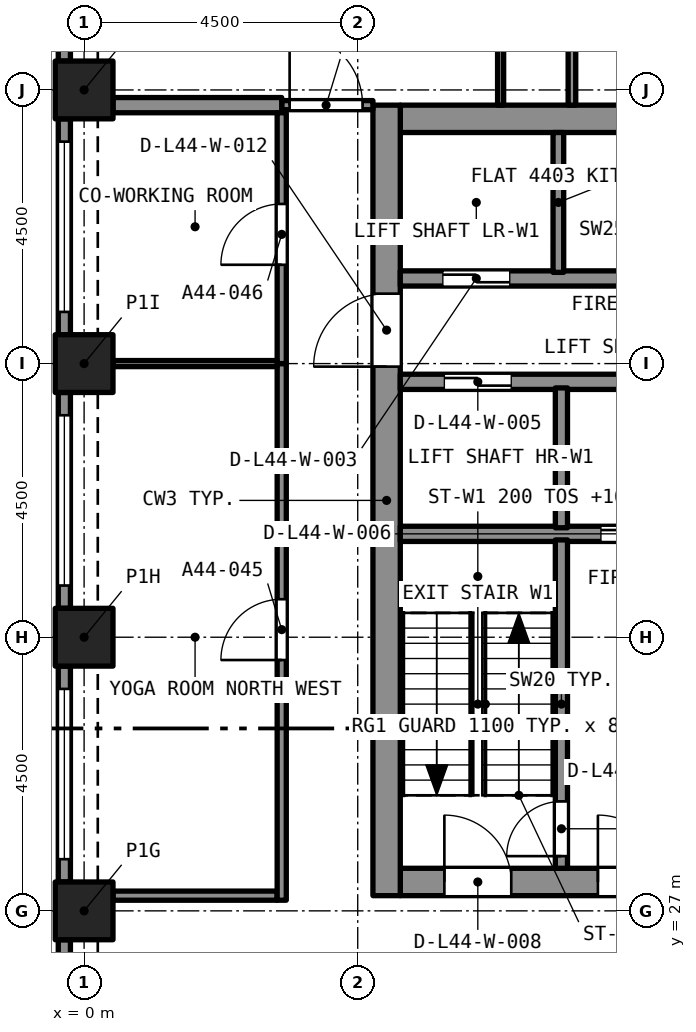
"""IFC4 building model, lengths in metres.
Left out: names, types, materials, properties, quantities, classifications, styles, units other than length and angle.
Written with IfcOpenShell. Run it as: python <this file> out.ifc"""

import sys

from ifc_helpers import new_model, si_unit, direction, frame, frame_2d, origin, origin_2d, place, context, subcontext, project, spatial, rectangle, extrude, element, fill, save


model = new_model("IFC4")
c1 = context("Model", 3, precision=1e-05, world=origin(), true_north=direction((0.0, 1.0)))
c2 = subcontext(c1, "Body", "Model", "MODEL_VIEW")
j1 = project(units=[si_unit("LENGTHUNIT", "METRE"), si_unit("PLANEANGLEUNIT", "RADIAN")], contexts=[c1])
p1 = place(None, origin())
s1 = spatial("IfcSite", under=j1, at=p1, CompositionType="ELEMENT")
p2 = place(p1, origin())
s2 = spatial("IfcBuilding", under=s1, at=p2, CompositionType="ELEMENT")
p3 = place(p2, frame((0.0, 0.0, 159.4)))
s3 = spatial("IfcBuildingStorey", under=s2, at=p3, CompositionType="ELEMENT", Elevation=159.4)
for number, where, z_axis, x_axis in (
    (1, (0.0, 27.0, 0.0), (0.0, 0.0, 1.0), (1.0, 0.0, 0.0)),
    (2, (0.0, 31.5, 0.0), (0.0, 0.0, 1.0), (1.0, 0.0, 0.0)),
    (3, (0.0, 36.0, 0.0), (0.0, 0.0, 1.0), (1.0, 0.0, 0.0)),
    (4, (0.0, 40.5, 0.0), (0.0, 0.0, 1.0), (1.0, 0.0, 0.0)),
):
    element("IfcColumn", number, at=place(p3, frame(where, z_axis=z_axis, x_axis=x_axis)), inside=s3, PredefinedType="COLUMN", context=c2, shape_type="SweptSolid", body=[
        extrude(rectangle(XDim=0.95, YDim=0.95, at=origin_2d()), origin(), (0.0, 0.0, 1.0), 4.4),
    ])
p4 = place(p3, frame((5.2, 27.475, 0.0), z_axis=(0.0, 0.0, 1.0), x_axis=(1.0, 0.0, 0.0)))
e5 = element("IfcWall", 5, at=p4, inside=s3, PredefinedType="SOLIDWALL", context=c2, shape_type="SweptSolid", body=[
    extrude(rectangle(XDim=7.6, YDim=0.45, at=frame_2d((3.8, 0.0))), origin(), (0.0, 0.0, 1.0), 4.4),
])
p5 = place(p4, frame((0.725, 0.0, 0.0)))
e6 = element("IfcOpeningElement", 6, at=p5, cuts=e5, PredefinedType="OPENING", context=c2, shape_type="SweptSolid", body=[
    extrude(rectangle(XDim=1.1, YDim=2.1, at=frame_2d((0.55, 1.05))), frame((0.0, 0.235, 0.0), z_axis=(0.0, -1.0, 0.0), x_axis=(1.0, 0.0, 0.0)), (0.0, 0.0, 1.0), 0.47),
])
p6 = place(p4, frame((3.25, 0.0, 0.0)))
e7 = element("IfcOpeningElement", 7, at=p6, cuts=e5, PredefinedType="OPENING", context=c2, shape_type="SweptSolid", body=[
    extrude(rectangle(XDim=1.1, YDim=2.1, at=frame_2d((0.55, 1.05))), frame((0.0, 0.235, 0.0), z_axis=(0.0, -1.0, 0.0), x_axis=(1.0, 0.0, 0.0)), (0.0, 0.0, 1.0), 0.47),
])
p7 = place(p4, frame((5.775, 0.0, 0.0)))
e8 = element("IfcOpeningElement", 8, at=p7, cuts=e5, PredefinedType="OPENING", context=c2, shape_type="SweptSolid", body=[
    extrude(rectangle(XDim=1.1, YDim=2.1, at=frame_2d((0.55, 1.05))), frame((0.0, 0.235, 0.0), z_axis=(0.0, -1.0, 0.0), x_axis=(1.0, 0.0, 0.0)), (0.0, 0.0, 1.0), 0.47),
])
p8 = place(p3, frame((5.2, 40.025, 0.0), z_axis=(0.0, 0.0, 1.0), x_axis=(1.0, 0.0, 0.0)))
e9 = element("IfcWall", 9, at=p8, inside=s3, PredefinedType="SOLIDWALL", context=c2, shape_type="SweptSolid", body=[
    extrude(rectangle(XDim=7.6, YDim=0.45, at=frame_2d((3.8, 0.0))), origin(), (0.0, 0.0, 1.0), 4.4),
])
p9 = place(p3, frame((4.975, 27.25, 0.0), z_axis=(0.0, 0.0, 1.0), x_axis=(0.0, 1.0, 0.0)))
e10 = element("IfcWall", 10, at=p9, inside=s3, PredefinedType="SOLIDWALL", context=c2, shape_type="SweptSolid", body=[
    extrude(rectangle(XDim=13.0, YDim=0.45, at=frame_2d((6.5, 0.0))), origin(), (0.0, 0.0, 1.0), 4.4),
])
p10 = place(p9, frame((8.7, 0.0, 0.0)))
e11 = element("IfcOpeningElement", 11, at=p10, cuts=e10, PredefinedType="OPENING", context=c2, shape_type="SweptSolid", body=[
    extrude(rectangle(XDim=1.2, YDim=2.1, at=frame_2d((0.6, 1.05))), frame((0.0, 0.235, 0.0), z_axis=(0.0, -1.0, 0.0), x_axis=(1.0, 0.0, 0.0)), (0.0, 0.0, 1.0), 0.47),
])
p11 = place(p3, frame((-0.325, 40.975, 0.0), z_axis=(0.0, 0.0, 1.0), x_axis=(0.0, 1.0, 0.0)))
e12 = element("IfcWall", 12, at=p11, inside=s3, PredefinedType="SOLIDWALL", context=c2, shape_type="SweptSolid", body=[
    extrude(rectangle(XDim=3.55, YDim=0.2, at=frame_2d((1.775, 0.0))), origin(), (0.0, 0.0, 1.0), 4.4),
])
p12 = place(p11, frame((0.375, 0.0, 0.45)))
e13 = element("IfcOpeningElement", 13, at=p12, cuts=e12, PredefinedType="OPENING", context=c2, shape_type="SweptSolid", body=[
    extrude(rectangle(XDim=2.8, YDim=2.55, at=frame_2d((1.4, 1.275))), frame((0.0, 0.11, 0.0), z_axis=(0.0, -1.0, 0.0), x_axis=(1.0, 0.0, 0.0)), (0.0, 0.0, 1.0), 0.22),
])
p13 = place(p3, frame((-0.325, 36.475, 0.0), z_axis=(0.0, 0.0, 1.0), x_axis=(0.0, 1.0, 0.0)))
e14 = element("IfcWall", 14, at=p13, inside=s3, PredefinedType="SOLIDWALL", context=c2, shape_type="SweptSolid", body=[
    extrude(rectangle(XDim=3.55, YDim=0.2, at=frame_2d((1.775, 0.0))), origin(), (0.0, 0.0, 1.0), 4.4),
])
p14 = place(p13, frame((0.375, 0.0, 0.45)))
e15 = element("IfcOpeningElement", 15, at=p14, cuts=e14, PredefinedType="OPENING", context=c2, shape_type="SweptSolid", body=[
    extrude(rectangle(XDim=2.8, YDim=2.55, at=frame_2d((1.4, 1.275))), frame((0.0, 0.11, 0.0), z_axis=(0.0, -1.0, 0.0), x_axis=(1.0, 0.0, 0.0)), (0.0, 0.0, 1.0), 0.22),
])
p15 = place(p3, frame((-0.325, 31.975, 0.0), z_axis=(0.0, 0.0, 1.0), x_axis=(0.0, 1.0, 0.0)))
e16 = element("IfcWall", 16, at=p15, inside=s3, PredefinedType="SOLIDWALL", context=c2, shape_type="SweptSolid", body=[
    extrude(rectangle(XDim=3.55, YDim=0.2, at=frame_2d((1.775, 0.0))), origin(), (0.0, 0.0, 1.0), 4.4),
])
p16 = place(p15, frame((0.375, 0.0, 0.45)))
e17 = element("IfcOpeningElement", 17, at=p16, cuts=e16, PredefinedType="OPENING", context=c2, shape_type="SweptSolid", body=[
    extrude(rectangle(XDim=2.8, YDim=2.55, at=frame_2d((1.4, 1.275))), frame((0.0, 0.11, 0.0), z_axis=(0.0, -1.0, 0.0), x_axis=(1.0, 0.0, 0.0)), (0.0, 0.0, 1.0), 0.22),
])
p17 = place(p3, frame((-0.325, 27.475, 0.0), z_axis=(0.0, 0.0, 1.0), x_axis=(0.0, 1.0, 0.0)))
e18 = element("IfcWall", 18, at=p17, inside=s3, PredefinedType="SOLIDWALL", context=c2, shape_type="SweptSolid", body=[
    extrude(rectangle(XDim=3.55, YDim=0.2, at=frame_2d((1.775, 0.0))), origin(), (0.0, 0.0, 1.0), 4.4),
])
p18 = place(p17, frame((0.375, 0.0, 0.45)))
e19 = element("IfcOpeningElement", 19, at=p18, cuts=e18, PredefinedType="OPENING", context=c2, shape_type="SweptSolid", body=[
    extrude(rectangle(XDim=2.8, YDim=2.55, at=frame_2d((1.4, 1.275))), frame((0.0, 0.11, 0.0), z_axis=(0.0, -1.0, 0.0), x_axis=(1.0, 0.0, 0.0)), (0.0, 0.0, 1.0), 0.22),
])
p19 = place(p3, frame((-0.325, 22.975, 0.0), z_axis=(0.0, 0.0, 1.0), x_axis=(0.0, 1.0, 0.0)))
e20 = element("IfcWall", 20, at=p19, inside=s3, PredefinedType="SOLIDWALL", context=c2, shape_type="SweptSolid", body=[
    extrude(rectangle(XDim=3.55, YDim=0.2, at=frame_2d((1.775, 0.0))), origin(), (0.0, 0.0, 1.0), 4.4),
])
p20 = place(p19, frame((0.375, 0.0, 0.45)))
e21 = element("IfcOpeningElement", 21, at=p20, cuts=e20, PredefinedType="OPENING", context=c2, shape_type="SweptSolid", body=[
    extrude(rectangle(XDim=2.8, YDim=2.55, at=frame_2d((1.4, 1.275))), frame((0.0, 0.11, 0.0), z_axis=(0.0, -1.0, 0.0), x_axis=(1.0, 0.0, 0.0)), (0.0, 0.0, 1.0), 0.22),
])
p21 = place(p3, frame((8.023, 40.25, 0.0), z_axis=(0.0, 0.0, 1.0), x_axis=(0.0, 1.0, 0.0)))
e22 = element("IfcWall", 22, at=p21, inside=s3, PredefinedType="PARTITIONING", context=c2, shape_type="SweptSolid", body=[
    extrude(rectangle(XDim=3.308, YDim=0.125, at=frame_2d((1.654, 0.0))), origin(), (0.0, 0.0, 1.0), 4.1),
])
p22 = place(p3, frame((6.85, 40.25, 0.0), z_axis=(0.0, 0.0, 1.0), x_axis=(0.0, 1.0, 0.0)))
e23 = element("IfcWall", 23, at=p22, inside=s3, PredefinedType="PARTITIONING", context=c2, shape_type="SweptSolid", body=[
    extrude(rectangle(XDim=3.32, YDim=0.1, at=frame_2d((1.66, 0.0))), origin(), (0.0, 0.0, 1.0), 4.1),
])
p23 = place(p3, frame((3.25, 40.25, 0.0), z_axis=(0.0, 0.0, 1.0), x_axis=(1.0, 0.0, 0.0)))
e24 = element("IfcWall", 24, at=p23, inside=s3, PredefinedType="PARTITIONING", context=c2, shape_type="SweptSolid", body=[
    extrude(rectangle(XDim=1.5, YDim=0.15, at=frame_2d((0.75, 0.0))), origin(), (0.0, 0.0, 1.0), 4.1),
])
p24 = place(p23, frame((0.13, 0.0, 0.0)))
e25 = element("IfcOpeningElement", 25, at=p24, cuts=e24, PredefinedType="OPENING", context=c2, shape_type="SweptSolid", body=[
    extrude(rectangle(XDim=1.2, YDim=2.4, at=frame_2d((0.6, 1.2))), frame((0.0, 0.085, 0.0), z_axis=(0.0, -1.0, 0.0), x_axis=(1.0, 0.0, 0.0)), (0.0, 0.0, 1.0), 0.17),
])
p25 = place(p3, frame((0.475, 40.25, 0.0), z_axis=(0.0, 0.0, 1.0), x_axis=(1.0, 0.0, 0.0)))
e26 = element("IfcWall", 26, at=p25, inside=s3, PredefinedType="PARTITIONING", context=c2, shape_type="SweptSolid", body=[
    extrude(rectangle(XDim=2.775, YDim=0.25, at=frame_2d((1.387, 0.0))), origin(), (0.0, 0.0, 1.0), 4.1),
])
p26 = place(p3, frame((0.475, 27.25, 0.0), z_axis=(0.0, 0.0, 1.0), x_axis=(1.0, 0.0, 0.0)))
e27 = element("IfcWall", 27, at=p26, inside=s3, PredefinedType="PARTITIONING", context=c2, shape_type="SweptSolid", body=[
    extrude(rectangle(XDim=2.7, YDim=0.15, at=frame_2d((1.35, 0.0))), origin(), (0.0, 0.0, 1.0), 4.1),
])
p27 = place(p3, frame((3.25, 27.175, 0.0), z_axis=(0.0, 0.0, 1.0), x_axis=(0.0, 1.0, 0.0)))
e28 = element("IfcWall", 28, at=p27, inside=s3, PredefinedType="PARTITIONING", context=c2, shape_type="SweptSolid", body=[
    extrude(rectangle(XDim=8.825, YDim=0.15, at=frame_2d((4.413, 0.0))), origin(), (0.0, 0.0, 1.0), 4.1),
])
p28 = place(p27, frame((3.95, 0.0, 0.0)))
e29 = element("IfcOpeningElement", 29, at=p28, cuts=e28, PredefinedType="OPENING", context=c2, shape_type="SweptSolid", body=[
    extrude(rectangle(XDim=1.0, YDim=2.1, at=frame_2d((0.5, 1.05))), frame((0.0, 0.085, 0.0), z_axis=(0.0, -1.0, 0.0), x_axis=(1.0, 0.0, 0.0)), (0.0, 0.0, 1.0), 0.17),
])
p29 = place(p3, frame((3.25, 36.0, 0.0), z_axis=(0.0, 0.0, 1.0), x_axis=(0.0, 1.0, 0.0)))
e30 = element("IfcWall", 30, at=p29, inside=s3, PredefinedType="PARTITIONING", context=c2, shape_type="SweptSolid", body=[
    extrude(rectangle(XDim=4.125, YDim=0.15, at=frame_2d((2.062, 0.0))), origin(), (0.0, 0.0, 1.0), 4.1),
])
p30 = place(p29, frame((1.625, 0.0, 0.0)))
e31 = element("IfcOpeningElement", 31, at=p30, cuts=e30, PredefinedType="OPENING", context=c2, shape_type="SweptSolid", body=[
    extrude(rectangle(XDim=1.0, YDim=2.1, at=frame_2d((0.5, 1.05))), frame((0.0, 0.085, 0.0), z_axis=(0.0, -1.0, 0.0), x_axis=(1.0, 0.0, 0.0)), (0.0, 0.0, 1.0), 0.17),
])
p31 = place(p3, frame((0.475, 36.0, 0.0), z_axis=(0.0, 0.0, 1.0), x_axis=(1.0, 0.0, 0.0)))
e32 = element("IfcWall", 32, at=p31, inside=s3, PredefinedType="PARTITIONING", context=c2, shape_type="SweptSolid", body=[
    extrude(rectangle(XDim=2.7, YDim=0.1, at=frame_2d((1.35, 0.0))), origin(), (0.0, 0.0, 1.0), 4.1),
])
p32 = place(p3, frame((5.2, 33.2, 0.0), z_axis=(0.0, 0.0, 1.0), x_axis=(1.0, 0.0, 0.0)))
e33 = element("IfcWall", 33, at=p32, inside=s3, PredefinedType="SOLIDWALL", context=c2, shape_type="SweptSolid", body=[
    extrude(rectangle(XDim=7.6, YDim=0.25, at=frame_2d((3.8, 0.0))), origin(), (0.0, 0.0, 1.0), 4.1),
])
p33 = place(p32, frame((3.3, 0.0, 0.0)))
e34 = element("IfcOpeningElement", 34, at=p33, cuts=e33, PredefinedType="OPENING", context=c2, shape_type="SweptSolid", body=[
    extrude(rectangle(XDim=1.0, YDim=2.1, at=frame_2d((0.5, 1.05))), frame((0.0, 0.135, 0.0), z_axis=(0.0, -1.0, 0.0), x_axis=(1.0, 0.0, 0.0)), (0.0, 0.0, 1.0), 0.27),
])
p34 = place(p3, frame((5.2, 35.7, 0.0), z_axis=(0.0, 0.0, 1.0), x_axis=(1.0, 0.0, 0.0)))
e35 = element("IfcWall", 35, at=p34, inside=s3, PredefinedType="SOLIDWALL", context=c2, shape_type="SweptSolid", body=[
    extrude(rectangle(XDim=7.6, YDim=0.25, at=frame_2d((3.8, 0.0))), origin(), (0.0, 0.0, 1.0), 4.1),
])
p35 = place(p34, frame((0.725, 0.0, 0.0)))
e36 = element("IfcOpeningElement", 36, at=p35, cuts=e35, PredefinedType="OPENING", context=c2, shape_type="SweptSolid", body=[
    extrude(rectangle(XDim=1.1, YDim=2.4, at=frame_2d((0.55, 1.2))), frame((0.0, 0.135, 0.0), z_axis=(0.0, -1.0, 0.0), x_axis=(1.0, 0.0, 0.0)), (0.0, 0.0, 1.0), 0.27),
])
p36 = place(p34, frame((5.875, 0.0, 0.0)))
e37 = element("IfcOpeningElement", 37, at=p36, cuts=e35, PredefinedType="OPENING", context=c2, shape_type="SweptSolid", body=[
    extrude(rectangle(XDim=0.9, YDim=2.1, at=frame_2d((0.45, 1.05))), frame((0.0, 0.135, 0.0), z_axis=(0.0, -1.0, 0.0), x_axis=(1.0, 0.0, 0.0)), (0.0, 0.0, 1.0), 0.27),
])
p37 = place(p3, frame((5.2, 37.4, 0.0), z_axis=(0.0, 0.0, 1.0), x_axis=(1.0, 0.0, 0.0)))
e38 = element("IfcWall", 38, at=p37, inside=s3, PredefinedType="SOLIDWALL", context=c2, shape_type="SweptSolid", body=[
    extrude(rectangle(XDim=7.6, YDim=0.25, at=frame_2d((3.8, 0.0))), origin(), (0.0, 0.0, 1.0), 4.1),
])
p38 = place(p37, frame((0.7, 0.0, 0.0)))
e39 = element("IfcOpeningElement", 39, at=p38, cuts=e38, PredefinedType="OPENING", context=c2, shape_type="SweptSolid", body=[
    extrude(rectangle(XDim=1.1, YDim=2.4, at=frame_2d((0.55, 1.2))), frame((0.0, 0.135, 0.0), z_axis=(0.0, -1.0, 0.0), x_axis=(1.0, 0.0, 0.0)), (0.0, 0.0, 1.0), 0.27),
])
p39 = place(p3, frame((7.85, 27.7, 0.0), z_axis=(0.0, 0.0, 1.0), x_axis=(0.0, 1.0, 0.0)))
e40 = element("IfcWall", 40, at=p39, inside=s3, PredefinedType="SOLIDWALL", context=c2, shape_type="SweptSolid", body=[
    extrude(rectangle(XDim=5.4, YDim=0.2, at=frame_2d((2.7, 0.0))), origin(), (0.0, 0.0, 1.0), 4.1),
])
p40 = place(p39, frame((0.2, 0.0, 0.0)))
e41 = element("IfcOpeningElement", 41, at=p40, cuts=e40, PredefinedType="OPENING", context=c2, shape_type="SweptSolid", body=[
    extrude(rectangle(XDim=0.9, YDim=2.1, at=frame_2d((0.45, 1.05))), frame((0.0, 0.11, 0.0), z_axis=(0.0, -1.0, 0.0), x_axis=(1.0, 0.0, 0.0)), (0.0, 0.0, 1.0), 0.22),
])
p41 = place(p3, frame((7.85, 33.3, 0.0), z_axis=(0.0, 0.0, 1.0), x_axis=(0.0, 1.0, 0.0)))
e42 = element("IfcWall", 42, at=p41, inside=s3, PredefinedType="SOLIDWALL", context=c2, shape_type="SweptSolid", body=[
    extrude(rectangle(XDim=2.3, YDim=0.2, at=frame_2d((1.15, 0.0))), origin(), (0.0, 0.0, 1.0), 4.1),
])
p42 = place(p3, frame((7.8, 37.5, 0.0), z_axis=(0.0, 0.0, 1.0), x_axis=(0.0, 1.0, 0.0)))
e43 = element("IfcWall", 43, at=p42, inside=s3, PredefinedType="SOLIDWALL", context=c2, shape_type="SweptSolid", body=[
    extrude(rectangle(XDim=2.3, YDim=0.175, at=frame_2d((1.15, 0.0))), origin(), (0.0, 0.0, 1.0), 4.1),
])
p43 = place(p14, origin())
e44 = element("IfcWindow", 44, at=p43, inside=s3, PartitioningType="SINGLE_PANEL", PredefinedType="WINDOW", context=c2, shape_type="SweptSolid", body=[
    extrude(rectangle(XDim=2.8, YDim=2.55, at=frame_2d((1.4, 1.275))), frame((0.0, 0.03, 0.0), z_axis=(0.0, -1.0, 0.0), x_axis=(1.0, 0.0, 0.0)), (0.0, 0.0, 1.0), 0.06),
])
fill(e15, e44)
p44 = place(p16, origin())
e45 = element("IfcWindow", 45, at=p44, inside=s3, PartitioningType="SINGLE_PANEL", PredefinedType="WINDOW", context=c2, shape_type="SweptSolid", body=[
    extrude(rectangle(XDim=2.8, YDim=2.55, at=frame_2d((1.4, 1.275))), frame((0.0, 0.03, 0.0), z_axis=(0.0, -1.0, 0.0), x_axis=(1.0, 0.0, 0.0)), (0.0, 0.0, 1.0), 0.06),
])
fill(e17, e45)
p45 = place(p18, origin())
e46 = element("IfcWindow", 46, at=p45, inside=s3, PartitioningType="SINGLE_PANEL", PredefinedType="WINDOW", context=c2, shape_type="SweptSolid", body=[
    extrude(rectangle(XDim=2.8, YDim=2.55, at=frame_2d((1.4, 1.275))), frame((0.0, 0.03, 0.0), z_axis=(0.0, -1.0, 0.0), x_axis=(1.0, 0.0, 0.0)), (0.0, 0.0, 1.0), 0.06),
])
fill(e19, e46)
p46 = place(p24, origin())
e47 = element("IfcDoor", 47, at=p46, inside=s3, OperationType="SINGLE_SWING_LEFT", PredefinedType="DOOR", context=c2, shape_type="SweptSolid", body=[
    extrude(rectangle(XDim=1.2, YDim=2.4, at=frame_2d((0.6, 1.2))), frame((0.0, 0.025, 0.0), z_axis=(0.0, -1.0, 0.0), x_axis=(1.0, 0.0, 0.0)), (0.0, 0.0, 1.0), 0.05),
])
fill(e25, e47)
p47 = place(p28, origin())
e48 = element("IfcDoor", 48, at=p47, inside=s3, OperationType="SINGLE_SWING_RIGHT", PredefinedType="DOOR", context=c2, shape_type="SweptSolid", body=[
    extrude(rectangle(XDim=1.0, YDim=2.1, at=frame_2d((0.5, 1.05))), frame((0.0, 0.025, 0.0), z_axis=(0.0, -1.0, 0.0), x_axis=(1.0, 0.0, 0.0)), (0.0, 0.0, 1.0), 0.05),
])
fill(e29, e48)
p48 = place(p30, origin())
e49 = element("IfcDoor", 49, at=p48, inside=s3, OperationType="SINGLE_SWING_RIGHT", PredefinedType="DOOR", context=c2, shape_type="SweptSolid", body=[
    extrude(rectangle(XDim=1.0, YDim=2.1, at=frame_2d((0.5, 1.05))), frame((0.0, 0.025, 0.0), z_axis=(0.0, -1.0, 0.0), x_axis=(1.0, 0.0, 0.0)), (0.0, 0.0, 1.0), 0.05),
])
fill(e31, e49)
p49 = place(p40, origin())
e50 = element("IfcDoor", 50, at=p49, inside=s3, OperationType="SINGLE_SWING_LEFT", PredefinedType="DOOR", context=c2, shape_type="SweptSolid", body=[
    extrude(rectangle(XDim=0.9, YDim=2.1, at=frame_2d((0.45, 1.05))), frame((0.0, 0.025, 0.0), z_axis=(0.0, -1.0, 0.0), x_axis=(1.0, 0.0, 0.0)), (0.0, 0.0, 1.0), 0.05),
])
fill(e41, e50)
p50 = place(p38, origin())
e51 = element("IfcDoor", 51, at=p50, inside=s3, OperationType="SLIDING_TO_LEFT", PredefinedType="DOOR", context=c2, shape_type="SweptSolid", body=[
    extrude(rectangle(XDim=1.1, YDim=2.4, at=frame_2d((0.55, 1.2))), frame((0.0, 0.025, 0.0), z_axis=(0.0, -1.0, 0.0), x_axis=(1.0, 0.0, 0.0)), (0.0, 0.0, 1.0), 0.05),
])
fill(e39, e51)
p51 = place(p35, origin())
e52 = element("IfcDoor", 52, at=p51, inside=s3, OperationType="SLIDING_TO_LEFT", PredefinedType="DOOR", context=c2, shape_type="SweptSolid", body=[
    extrude(rectangle(XDim=1.1, YDim=2.4, at=frame_2d((0.55, 1.2))), frame((0.0, 0.025, 0.0), z_axis=(0.0, -1.0, 0.0), x_axis=(1.0, 0.0, 0.0)), (0.0, 0.0, 1.0), 0.05),
])
fill(e36, e52)
p52 = place(p33, origin())
e53 = element("IfcDoor", 53, at=p52, inside=s3, OperationType="SLIDING_TO_LEFT", PredefinedType="DOOR", context=c2, shape_type="SweptSolid", body=[
    extrude(rectangle(XDim=1.0, YDim=2.1, at=frame_2d((0.5, 1.05))), frame((0.0, 0.025, 0.0), z_axis=(0.0, -1.0, 0.0), x_axis=(1.0, 0.0, 0.0)), (0.0, 0.0, 1.0), 0.05),
])
fill(e34, e53)
p53 = place(p5, origin())
e54 = element("IfcDoor", 54, at=p53, inside=s3, OperationType="SINGLE_SWING_LEFT", PredefinedType="DOOR", context=c2, shape_type="SweptSolid", body=[
    extrude(rectangle(XDim=1.1, YDim=2.1, at=frame_2d((0.55, 1.05))), frame((0.0, 0.025, 0.0), z_axis=(0.0, -1.0, 0.0), x_axis=(1.0, 0.0, 0.0)), (0.0, 0.0, 1.0), 0.05),
])
fill(e6, e54)
p54 = place(p6, origin())
e55 = element("IfcDoor", 55, at=p54, inside=s3, OperationType="SINGLE_SWING_LEFT", PredefinedType="DOOR", context=c2, shape_type="SweptSolid", body=[
    extrude(rectangle(XDim=1.1, YDim=2.1, at=frame_2d((0.55, 1.05))), frame((0.0, 0.025, 0.0), z_axis=(0.0, -1.0, 0.0), x_axis=(1.0, 0.0, 0.0)), (0.0, 0.0, 1.0), 0.05),
])
fill(e7, e55)
p55 = place(p10, origin())
e56 = element("IfcDoor", 56, at=p55, inside=s3, OperationType="SINGLE_SWING_LEFT", PredefinedType="DOOR", context=c2, shape_type="SweptSolid", body=[
    extrude(rectangle(XDim=1.2, YDim=2.1, at=frame_2d((0.6, 1.05))), frame((0.0, 0.025, 0.0), z_axis=(0.0, -1.0, 0.0), x_axis=(1.0, 0.0, 0.0)), (0.0, 0.0, 1.0), 0.05),
])
fill(e11, e56)
save(model, sys.argv[1])
